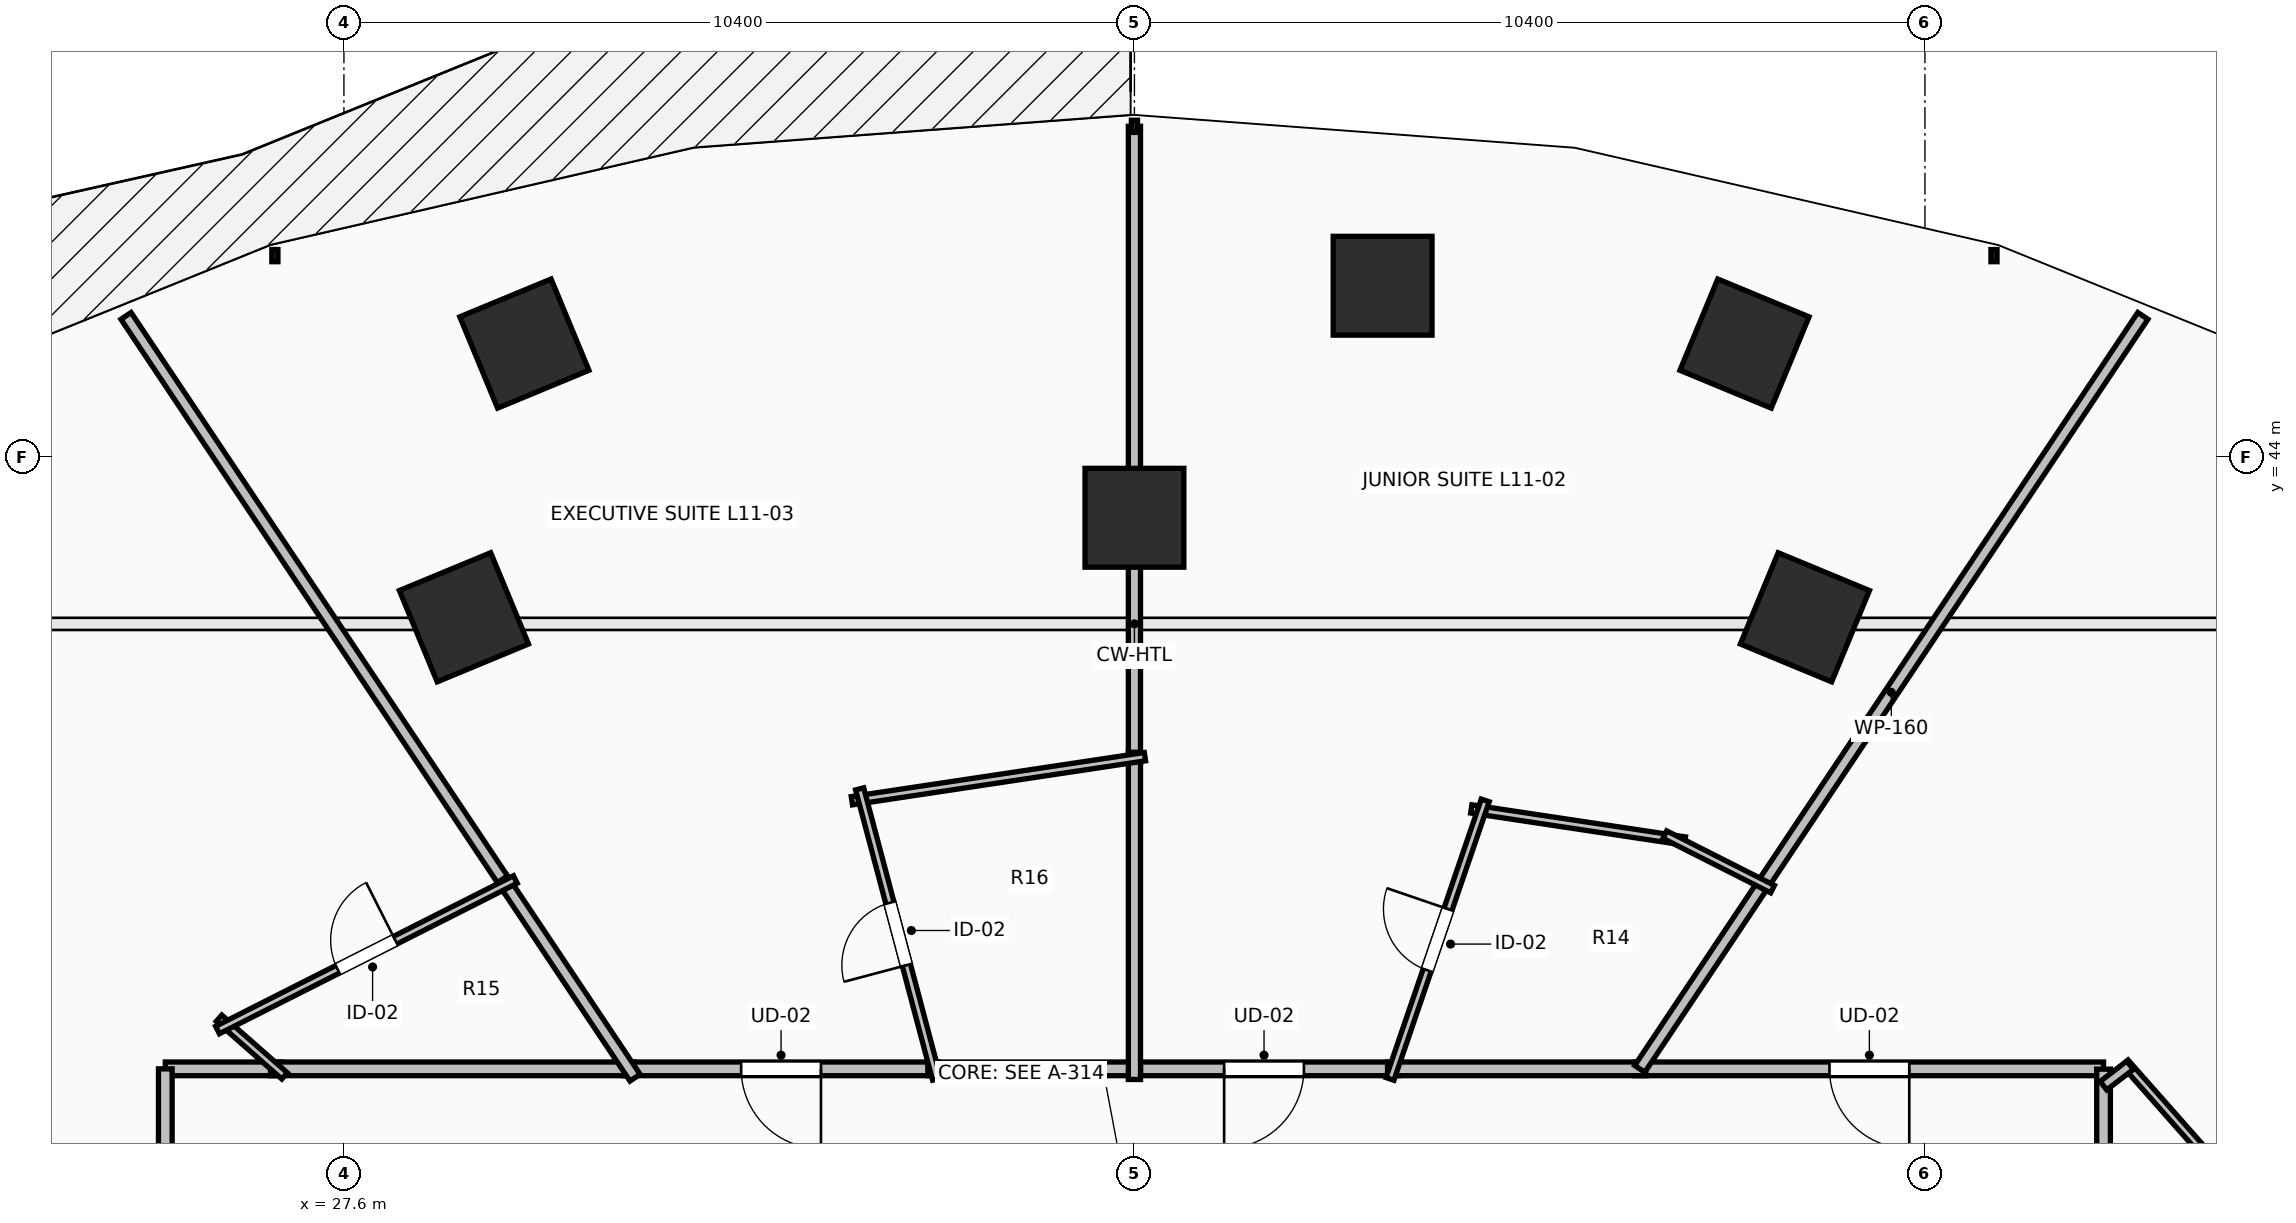
"""IFC4 building model, lengths in metres.
Left out: names, types, materials, properties, quantities, classifications, styles, units other than length and angle.
Written with IfcOpenShell. Run it as: python <this file> out.ifc"""

import sys

from ifc_helpers import new_model, si_unit, direction, frame, frame_2d, origin, origin_2d, place, context, subcontext, project, spatial, rectangle, extrude, element, fill, save


model = new_model("IFC4")
c1 = context("Model", 3, precision=1e-05, world=origin(), true_north=direction((0.0, 1.0)))
c2 = subcontext(c1, "Body", "Model", "MODEL_VIEW")
j1 = project(units=[si_unit("LENGTHUNIT", "METRE"), si_unit("PLANEANGLEUNIT", "RADIAN")], contexts=[c1])
p1 = place(None, origin())
s1 = spatial("IfcSite", under=j1, at=p1, CompositionType="ELEMENT")
p2 = place(p1, origin())
s2 = spatial("IfcBuilding", under=s1, at=p2, CompositionType="ELEMENT")
p3 = place(p2, frame((0.0, 0.0, 45.0)))
s3 = spatial("IfcBuildingStorey", under=s2, at=p3, CompositionType="ELEMENT", Elevation=45.0)
for number, where, z_axis, x_axis in (
    (1, (46.821, 41.891, 0.0), (0.0, 0.0, 1.0), (0.383, 0.924, 0.0)),
    (2, (38.0, 43.2, 0.0), (0.0, 0.0, 1.0), (0.0, 1.0, 0.0)),
    (3, (29.179, 41.891, 0.0), (0.0, 0.0, 1.0), (-0.383, 0.924, 0.0)),
    (4, (46.026, 45.492, 0.0), (0.0, 0.0, 1.0), (0.383, 0.924, 0.0)),
    (5, (41.265, 46.252, 0.0), (0.0, 0.0, 1.0), (0.0, 1.0, 0.0)),
    (6, (29.974, 45.492, 0.0), (0.0, 0.0, 1.0), (-0.383, 0.924, 0.0)),
):
    element("IfcColumn", number, at=place(p3, frame(where, z_axis=z_axis, x_axis=x_axis)), inside=s3, PredefinedType="COLUMN", context=c2, shape_type="SweptSolid", body=[
        extrude(rectangle(XDim=1.3, YDim=1.3, at=origin_2d()), origin(), (0.0, 0.0, 1.0), 3.5),
    ])
p4 = place(p3, frame((50.75, 35.95, 0.0), z_axis=(0.0, 0.0, 1.0), x_axis=(-1.0, 0.0, 0.0)))
e7 = element("IfcWall", 7, at=p4, inside=s3, PredefinedType="PARTITIONING", context=c2, shape_type="SweptSolid", body=[
    extrude(rectangle(XDim=6.162, YDim=0.18, at=frame_2d((3.081, 0.0))), origin(), (0.0, 0.0, 1.0), 2.432),
])
p5 = place(p4, frame((2.556, 0.0, 0.0)))
e8 = element("IfcOpeningElement", 8, at=p5, cuts=e7, PredefinedType="OPENING", context=c2, shape_type="SweptSolid", body=[
    extrude(rectangle(XDim=1.05, YDim=2.2, at=frame_2d((0.525, 1.1))), frame((0.0, 0.105, 0.0), z_axis=(0.0, -1.0, 0.0), x_axis=(1.0, 0.0, 0.0)), (0.0, 0.0, 1.0), 0.21),
])
p6 = place(p3, frame((50.75, 31.081, 0.0), z_axis=(0.0, 0.0, 1.0), x_axis=(0.0, 1.0, 0.0)))
e9 = element("IfcWall", 9, at=p6, inside=s3, PredefinedType="PARTITIONING", context=c2, shape_type="SweptSolid", body=[
    extrude(rectangle(XDim=4.865, YDim=0.18, at=frame_2d((2.433, 0.0))), origin(), (0.0, 0.0, 1.0), 2.432),
])
p7 = place(p3, frame((41.47, 35.95, 0.0), z_axis=(0.0, 0.0, 1.0), x_axis=(-1.0, 0.0, 0.0)))
e10 = element("IfcWall", 10, at=p7, inside=s3, PredefinedType="PARTITIONING", context=c2, shape_type="SweptSolid", body=[
    extrude(rectangle(XDim=3.53, YDim=0.18, at=frame_2d((1.765, 0.0))), origin(), (0.0, 0.0, 1.0), 3.24),
])
p8 = place(p7, frame((1.24, 0.0, 0.0)))
e11 = element("IfcOpeningElement", 11, at=p8, cuts=e10, PredefinedType="OPENING", context=c2, shape_type="SweptSolid", body=[
    extrude(rectangle(XDim=1.05, YDim=2.2, at=frame_2d((0.525, 1.1))), frame((0.0, 0.105, 0.0), z_axis=(0.0, -1.0, 0.0), x_axis=(1.0, 0.0, 0.0)), (0.0, 0.0, 1.0), 0.21),
])
p9 = place(p3, frame((44.728, 35.95, 0.0), z_axis=(0.0, 0.0, 1.0), x_axis=(-1.0, 0.0, 0.0)))
e12 = element("IfcWall", 12, at=p9, inside=s3, PredefinedType="PARTITIONING", context=c2, shape_type="SweptSolid", body=[
    extrude(rectangle(XDim=3.398, YDim=0.18, at=frame_2d((1.699, 0.0))), origin(), (0.0, 0.0, 1.0), 3.24),
])
p10 = place(p3, frame((35.422, 35.95, 0.0), z_axis=(0.0, 0.0, 1.0), x_axis=(-1.0, 0.0, 0.0)))
e13 = element("IfcWall", 13, at=p10, inside=s3, PredefinedType="PARTITIONING", context=c2, shape_type="SweptSolid", body=[
    extrude(rectangle(XDim=4.142, YDim=0.18, at=frame_2d((2.071, 0.0))), origin(), (0.0, 0.0, 1.0), 3.24),
])
p11 = place(p10, frame((1.546, 0.0, 0.0)))
e14 = element("IfcOpeningElement", 14, at=p11, cuts=e13, PredefinedType="OPENING", context=c2, shape_type="SweptSolid", body=[
    extrude(rectangle(XDim=1.05, YDim=2.2, at=frame_2d((0.525, 1.1))), frame((0.0, 0.105, 0.0), z_axis=(0.0, -1.0, 0.0), x_axis=(1.0, 0.0, 0.0)), (0.0, 0.0, 1.0), 0.21),
])
p12 = place(p3, frame((38.08, 35.95, 0.0), z_axis=(0.0, 0.0, 1.0), x_axis=(-1.0, 0.0, 0.0)))
e15 = element("IfcWall", 15, at=p12, inside=s3, PredefinedType="PARTITIONING", context=c2, shape_type="SweptSolid", body=[
    extrude(rectangle(XDim=2.798, YDim=0.18, at=frame_2d((1.399, 0.0))), origin(), (0.0, 0.0, 1.0), 3.24),
])
p13 = place(p3, frame((26.774, 35.95, 0.0), z_axis=(0.0, 0.0, 1.0), x_axis=(-1.0, 0.0, 0.0)))
e16 = element("IfcWall", 16, at=p13, inside=s3, PredefinedType="PARTITIONING", context=c2, shape_type="SweptSolid", body=[
    extrude(rectangle(XDim=1.524, YDim=0.18, at=frame_2d((0.762, 0.0))), origin(), (0.0, 0.0, 1.0), 2.886),
])
p14 = place(p3, frame((25.25, 35.95, 0.0), z_axis=(0.0, 0.0, 1.0), x_axis=(0.0, -1.0, 0.0)))
e17 = element("IfcWall", 17, at=p14, inside=s3, PredefinedType="PARTITIONING", context=c2, shape_type="SweptSolid", body=[
    extrude(rectangle(XDim=4.729, YDim=0.18, at=frame_2d((2.365, 0.0))), origin(), (0.0, 0.0, 1.0), 2.432),
])
p15 = place(p14, frame((1.84, 0.0, 0.0)))
e18 = element("IfcOpeningElement", 18, at=p15, cuts=e17, PredefinedType="OPENING", context=c2, shape_type="SweptSolid", body=[
    extrude(rectangle(XDim=1.05, YDim=2.2, at=frame_2d((0.525, 1.1))), frame((0.0, 0.105, 0.0), z_axis=(0.0, -1.0, 0.0), x_axis=(1.0, 0.0, 0.0)), (0.0, 0.0, 1.0), 0.21),
])
p16 = place(p3, frame((31.42, 35.95, 0.0), z_axis=(0.0, 0.0, 1.0), x_axis=(-1.0, 0.0, 0.0)))
e19 = element("IfcWall", 19, at=p16, inside=s3, PredefinedType="PARTITIONING", context=c2, shape_type="SweptSolid", body=[
    extrude(rectangle(XDim=4.786, YDim=0.18, at=frame_2d((2.393, 0.0))), origin(), (0.0, 0.0, 1.0), 2.432),
])
p17 = place(p3, frame((51.031, 36.03, 0.0), z_axis=(0.0, 0.0, 1.0), x_axis=(0.662106207726, -0.749410014405, 0.0)))
e20 = element("IfcWall", 20, at=p17, inside=s3, PredefinedType="PARTITIONING", context=c2, shape_type="SweptSolid", body=[
    extrude(rectangle(XDim=4.665, YDim=0.11, at=frame_2d((2.332, 0.0))), origin(), (0.0, 0.0, 1.0), 2.432),
])
p18 = place(p17, frame((1.907, 0.0, 0.0)))
e21 = element("IfcOpeningElement", 21, at=p18, cuts=e20, PredefinedType="OPENING", context=c2, shape_type="SweptSolid", body=[
    extrude(rectangle(XDim=0.85, YDim=2.1, at=frame_2d((0.425, 1.05))), frame((0.0, 0.07, 0.0), z_axis=(0.0, -1.0, 0.0), x_axis=(1.0, 0.0, 0.0)), (0.0, 0.0, 1.0), 0.14),
])
p19 = place(p3, frame((51.267, 45.856, 0.0), z_axis=(0.0, 0.0, 1.0), x_axis=(-0.55557946655, -0.831463442581, 0.0)))
e22 = element("IfcWall", 22, at=p19, inside=s3, PredefinedType="PARTITIONING", context=c2, shape_type="SweptSolid", body=[
    extrude(rectangle(XDim=11.914, YDim=0.16, at=frame_2d((5.957, 0.0))), origin(), (0.0, 0.0, 1.0), 2.432),
])
p20 = place(p3, frame((42.432, 39.37, 0.0), z_axis=(0.0, 0.0, 1.0), x_axis=(0.988877663763, -0.148731187416, 0.0)))
e23 = element("IfcWall", 23, at=p20, inside=s3, PredefinedType="PARTITIONING", context=c2, shape_type="SweptSolid", body=[
    extrude(rectangle(XDim=2.841, YDim=0.11, at=frame_2d((1.421, 0.0))), origin(), (0.0, 0.0, 1.0), 3.24),
])
p21 = place(p3, frame((44.978, 39.031, 0.0), z_axis=(0.0, 0.0, 1.0), x_axis=(0.892388427115, -0.451268096758, 0.0)))
e24 = element("IfcWall", 24, at=p21, inside=s3, PredefinedType="PARTITIONING", context=c2, shape_type="SweptSolid", body=[
    extrude(rectangle(XDim=1.588, YDim=0.11, at=frame_2d((0.794, 0.0))), origin(), (0.0, 0.0, 1.0), 3.24),
])
p22 = place(p3, frame((41.362, 35.817, 0.0), z_axis=(0.0, 0.0, 1.0), x_axis=(0.323669856167, 0.946170082072, 0.0)))
e25 = element("IfcWall", 25, at=p22, inside=s3, PredefinedType="PARTITIONING", context=c2, shape_type="SweptSolid", body=[
    extrude(rectangle(XDim=3.873, YDim=0.11, at=frame_2d((1.936, 0.0))), origin(), (0.0, 0.0, 1.0), 2.886),
])
p23 = place(p22, frame((1.511, 0.0, 0.0)))
e26 = element("IfcOpeningElement", 26, at=p23, cuts=e25, PredefinedType="OPENING", context=c2, shape_type="SweptSolid", body=[
    extrude(rectangle(XDim=0.85, YDim=2.1, at=frame_2d((0.425, 1.05))), frame((0.0, 0.07, 0.0), z_axis=(0.0, -1.0, 0.0), x_axis=(1.0, 0.0, 0.0)), (0.0, 0.0, 1.0), 0.14),
])
p24 = place(p3, frame((38.0, 48.35, 0.0), z_axis=(0.0, 0.0, 1.0), x_axis=(0.0, -1.0, 0.0)))
e27 = element("IfcWall", 27, at=p24, inside=s3, PredefinedType="PARTITIONING", context=c2, shape_type="SweptSolid", body=[
    extrude(rectangle(XDim=8.375, YDim=0.16, at=frame_2d((4.188, 0.0))), origin(), (0.0, 0.0, 1.0), 2.432),
])
p25 = place(p3, frame((38.0, 40.115, 0.0), z_axis=(0.0, 0.0, 1.0), x_axis=(0.0, -1.0, 0.0)))
e28 = element("IfcWall", 28, at=p25, inside=s3, PredefinedType="PARTITIONING", context=c2, shape_type="SweptSolid", body=[
    extrude(rectangle(XDim=4.305, YDim=0.16, at=frame_2d((2.152, 0.0))), origin(), (0.0, 0.0, 1.0), 2.886),
])
p26 = place(p3, frame((34.283, 39.477, 0.0), z_axis=(0.0, 0.0, 1.0), x_axis=(0.988889916837, 0.148649696864, 0.0)))
e29 = element("IfcWall", 29, at=p26, inside=s3, PredefinedType="PARTITIONING", context=c2, shape_type="SweptSolid", body=[
    extrude(rectangle(XDim=3.899, YDim=0.11, at=frame_2d((1.949, 0.0))), origin(), (0.0, 0.0, 1.0), 2.432),
])
p27 = place(p3, frame((35.398, 35.815, 0.0), z_axis=(0.0, 0.0, 1.0), x_axis=(-0.256396995263, 0.966571560113, 0.0)))
e30 = element("IfcWall", 30, at=p27, inside=s3, PredefinedType="PARTITIONING", context=c2, shape_type="SweptSolid", body=[
    extrude(rectangle(XDim=3.951, YDim=0.11, at=frame_2d((1.975, 0.0))), origin(), (0.0, 0.0, 1.0), 2.432),
])
p28 = place(p27, frame((1.55, 0.0, 0.0)))
e31 = element("IfcOpeningElement", 31, at=p28, cuts=e30, PredefinedType="OPENING", context=c2, shape_type="SweptSolid", body=[
    extrude(rectangle(XDim=0.85, YDim=2.1, at=frame_2d((0.425, 1.05))), frame((0.0, 0.07, 0.0), z_axis=(0.0, -1.0, 0.0), x_axis=(1.0, 0.0, 0.0)), (0.0, 0.0, 1.0), 0.14),
])
p29 = place(p3, frame((24.733, 45.856, 0.0), z_axis=(0.0, 0.0, 1.0), x_axis=(0.555564858458, -0.831473203444, 0.0)))
e32 = element("IfcWall", 32, at=p29, inside=s3, PredefinedType="PARTITIONING", context=c2, shape_type="SweptSolid", body=[
    extrude(rectangle(XDim=9.054, YDim=0.16, at=frame_2d((4.527, 0.0))), origin(), (0.0, 0.0, 1.0), 2.432),
])
p30 = place(p3, frame((29.685, 38.444, 0.0), z_axis=(0.0, 0.0, 1.0), x_axis=(0.555596981897, -0.831451738652, 0.0)))
e33 = element("IfcWall", 33, at=p30, inside=s3, PredefinedType="PARTITIONING", context=c2, shape_type="SweptSolid", body=[
    extrude(rectangle(XDim=3.14, YDim=0.16, at=frame_2d((1.57, 0.0))), origin(), (0.0, 0.0, 1.0), 2.432),
])
p31 = place(p3, frame((26.819, 35.857, 0.0), z_axis=(0.0, 0.0, 1.0), x_axis=(-0.750624975639, 0.660728496394, 0.0)))
e34 = element("IfcWall", 34, at=p31, inside=s3, PredefinedType="PARTITIONING", context=c2, shape_type="SweptSolid", body=[
    extrude(rectangle(XDim=1.149, YDim=0.11, at=frame_2d((0.574, 0.0))), origin(), (0.0, 0.0, 1.0), 2.886),
])
p32 = place(p3, frame((25.937, 36.461, 0.0), z_axis=(0.0, 0.0, 1.0), x_axis=(0.892461080662, 0.451124394711, 0.0)))
e35 = element("IfcWall", 35, at=p32, inside=s3, PredefinedType="PARTITIONING", context=c2, shape_type="SweptSolid", body=[
    extrude(rectangle(XDim=4.39, YDim=0.11, at=frame_2d((2.195, 0.0))), origin(), (0.0, 0.0, 1.0), 2.432),
])
p33 = place(p32, frame((1.77, 0.0, 0.0)))
e36 = element("IfcOpeningElement", 36, at=p33, cuts=e35, PredefinedType="OPENING", context=c2, shape_type="SweptSolid", body=[
    extrude(rectangle(XDim=0.85, YDim=2.1, at=frame_2d((0.425, 1.05))), frame((0.0, 0.07, 0.0), z_axis=(0.0, -1.0, 0.0), x_axis=(1.0, 0.0, 0.0)), (0.0, 0.0, 1.0), 0.14),
])
p34 = place(p3, frame((51.099, 35.997, 0.0), z_axis=(0.0, 0.0, 1.0), x_axis=(-0.794185002189, -0.607676050456, 0.0)))
e37 = element("IfcWall", 37, at=p34, inside=s3, PredefinedType="PARTITIONING", context=c2, shape_type="SweptSolid", body=[
    extrude(rectangle(XDim=0.441, YDim=0.14, at=frame_2d((0.221, 0.0))), origin(), (0.0, 0.0, 1.0), 2.886),
])
p35 = place(p5, origin())
e38 = element("IfcDoor", 38, at=p35, inside=s3, OperationType="SINGLE_SWING_LEFT", PredefinedType="DOOR", context=c2, shape_type="SweptSolid", body=[
    extrude(rectangle(XDim=1.05, YDim=2.2, at=frame_2d((0.525, 1.1))), frame((0.0, 0.025, 0.0), z_axis=(0.0, -1.0, 0.0), x_axis=(1.0, 0.0, 0.0)), (0.0, 0.0, 1.0), 0.05),
])
fill(e8, e38)
p36 = place(p8, origin())
e39 = element("IfcDoor", 39, at=p36, inside=s3, OperationType="SINGLE_SWING_RIGHT", PredefinedType="DOOR", context=c2, shape_type="SweptSolid", body=[
    extrude(rectangle(XDim=1.05, YDim=2.2, at=frame_2d((0.525, 1.1))), frame((0.0, 0.025, 0.0), z_axis=(0.0, -1.0, 0.0), x_axis=(1.0, 0.0, 0.0)), (0.0, 0.0, 1.0), 0.05),
])
fill(e11, e39)
p37 = place(p11, origin())
e40 = element("IfcDoor", 40, at=p37, inside=s3, OperationType="SINGLE_SWING_LEFT", PredefinedType="DOOR", context=c2, shape_type="SweptSolid", body=[
    extrude(rectangle(XDim=1.05, YDim=2.2, at=frame_2d((0.525, 1.1))), frame((0.0, 0.025, 0.0), z_axis=(0.0, -1.0, 0.0), x_axis=(1.0, 0.0, 0.0)), (0.0, 0.0, 1.0), 0.05),
])
fill(e14, e40)
p38 = place(p23, origin())
e41 = element("IfcDoor", 41, at=p38, inside=s3, OperationType="SINGLE_SWING_RIGHT", PredefinedType="DOOR", context=c2, shape_type="SweptSolid", body=[
    extrude(rectangle(XDim=0.85, YDim=2.1, at=frame_2d((0.425, 1.05))), frame((0.0, 0.025, 0.0), z_axis=(0.0, -1.0, 0.0), x_axis=(1.0, 0.0, 0.0)), (0.0, 0.0, 1.0), 0.05),
])
fill(e26, e41)
p39 = place(p28, origin())
e42 = element("IfcDoor", 42, at=p39, inside=s3, OperationType="SINGLE_SWING_LEFT", PredefinedType="DOOR", context=c2, shape_type="SweptSolid", body=[
    extrude(rectangle(XDim=0.85, YDim=2.1, at=frame_2d((0.425, 1.05))), frame((0.0, 0.025, 0.0), z_axis=(0.0, -1.0, 0.0), x_axis=(1.0, 0.0, 0.0)), (0.0, 0.0, 1.0), 0.05),
])
fill(e31, e42)
p40 = place(p33, origin())
e43 = element("IfcDoor", 43, at=p40, inside=s3, OperationType="SINGLE_SWING_RIGHT", PredefinedType="DOOR", context=c2, shape_type="SweptSolid", body=[
    extrude(rectangle(XDim=0.85, YDim=2.1, at=frame_2d((0.425, 1.05))), frame((0.0, 0.025, 0.0), z_axis=(0.0, -1.0, 0.0), x_axis=(1.0, 0.0, 0.0)), (0.0, 0.0, 1.0), 0.05),
])
fill(e36, e43)
save(model, sys.argv[1])
